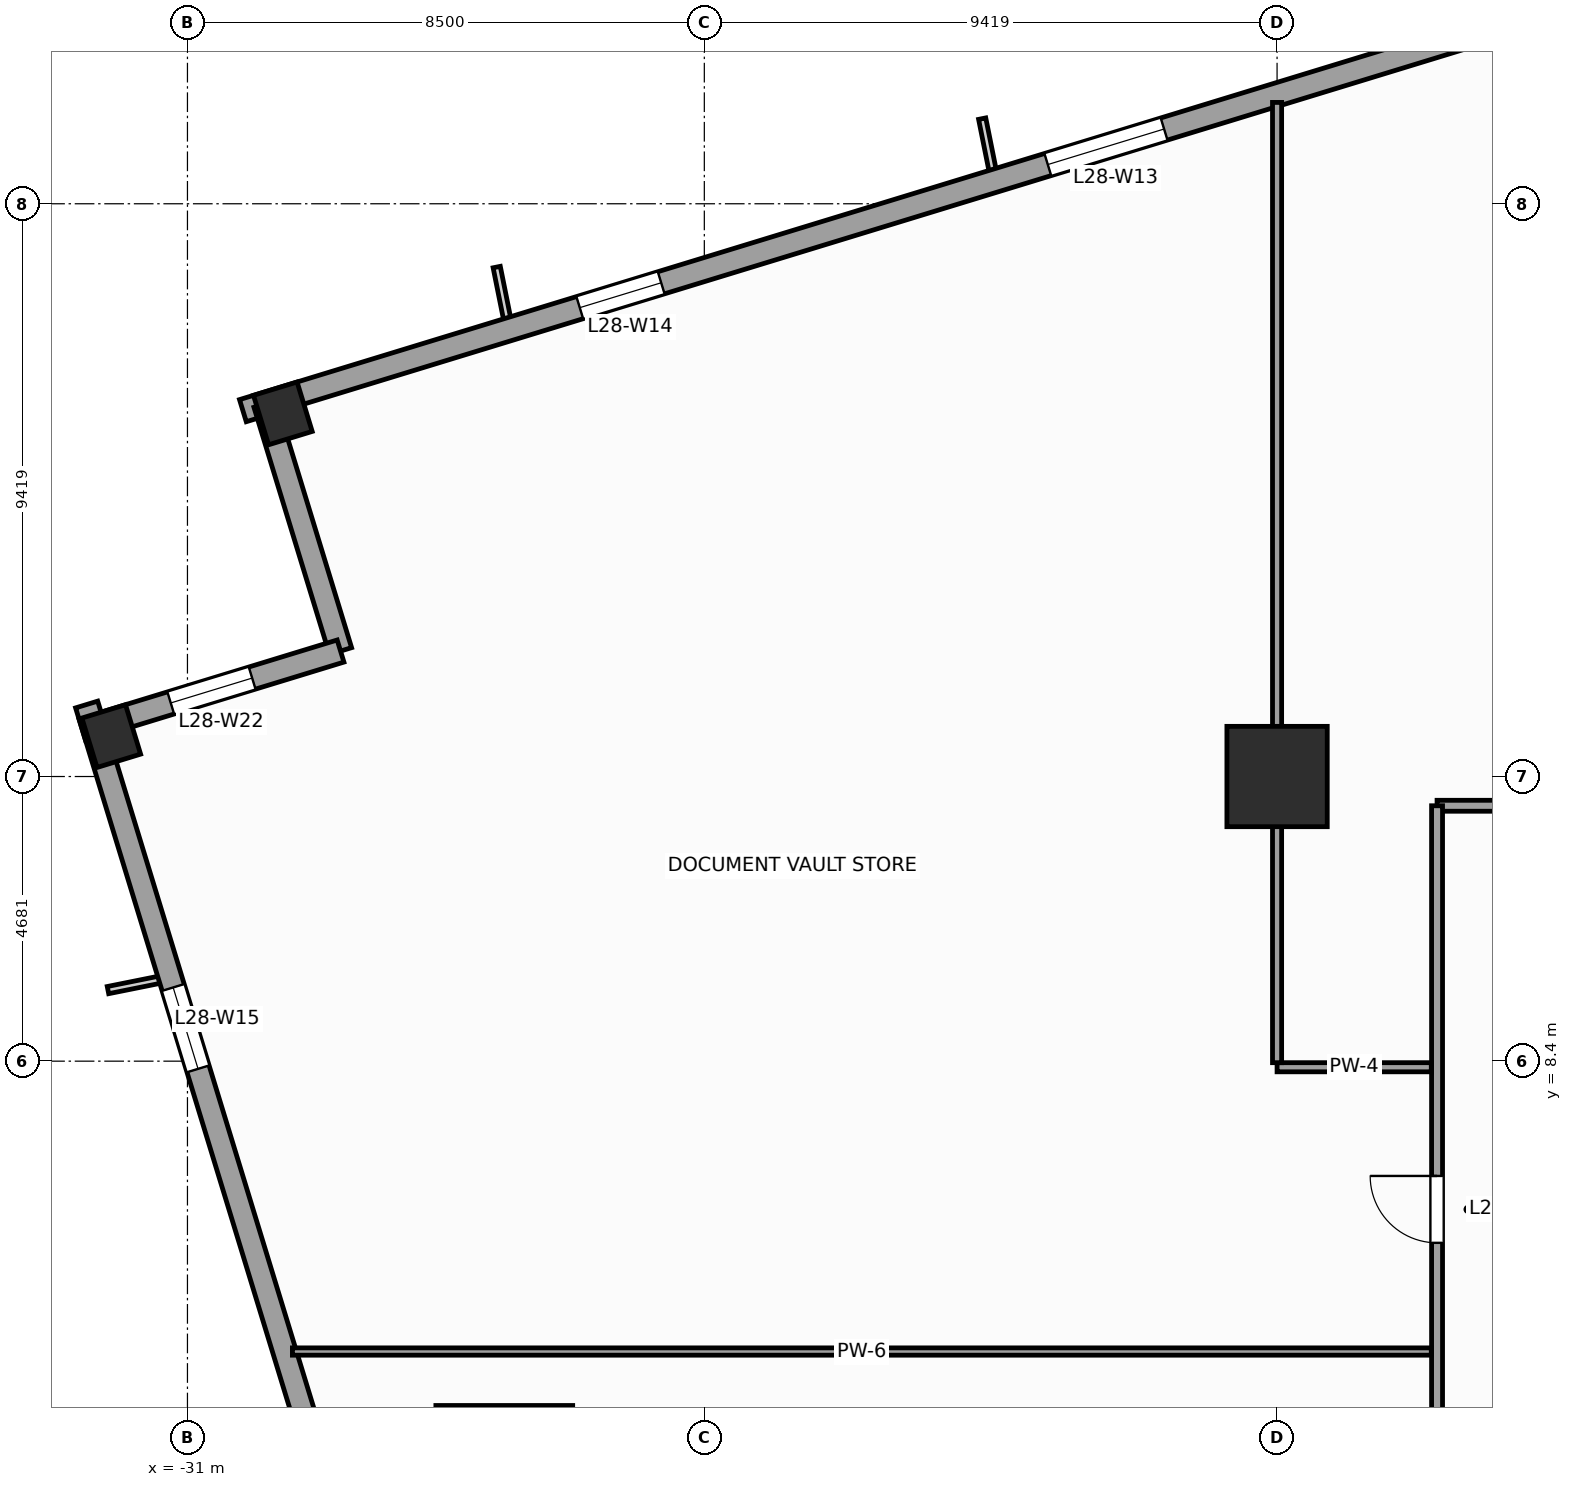
"""IFC4 building model, lengths in metres.
Left out: names, types, materials, properties, quantities, classifications, styles, units other than length and angle.
Written with IfcOpenShell. Run it as: python <this file> out.ifc"""

import sys

from ifc_helpers import new_model, si_unit, direction, frame, frame_2d, origin, origin_2d, place, context, subcontext, project, spatial, rectangle, extrude, source, transform, mapped, element, fill, save


model = new_model("IFC4")
c1 = context("Model", 3, precision=1e-05, world=origin(), true_north=direction((0.0, 1.0)))
c2 = subcontext(c1, "Body", "Model", "MODEL_VIEW")
j1 = project(units=[si_unit("LENGTHUNIT", "METRE"), si_unit("PLANEANGLEUNIT", "RADIAN")], contexts=[c1])
p1 = place(None, origin())
s1 = spatial("IfcSite", under=j1, at=p1, CompositionType="ELEMENT")
p2 = place(p1, origin())
s2 = spatial("IfcBuilding", under=s1, at=p2, CompositionType="ELEMENT")
p3 = place(p2, frame((0.0, 0.0, 119.2)))
s3 = spatial("IfcBuildingStorey", under=s2, at=p3, CompositionType="ELEMENT", Elevation=119.2)
m1 = source(origin(), c2, "Body", "SweptSolid", [
    extrude(rectangle(XDim=1.65, YDim=1.65, at=origin_2d()), origin(), (0.0, 0.0, 1.0), 4.0),
])
p4 = place(p3, frame((-13.081, 13.081, 0.0), z_axis=(0.0, 0.0, 1.0), x_axis=(1.0, 0.0, 0.0)))
e1 = element("IfcColumn", 1, at=p4, inside=s3, PredefinedType="COLUMN", context=c2, shape_type="MappedRepresentation", body=[
    mapped(m1, transform((0.0, 0.0, 0.0), scale=1.0)),
])
m2 = source(origin(), c2, "Body", "SweptSolid", [
    extrude(rectangle(XDim=0.75, YDim=0.85, at=origin_2d()), origin(), (0.0, 0.0, 1.0), 4.0),
])
for number, where, z_axis, x_axis in (
    (2, (-29.431, 19.052, 0.0), (0.0, 0.0, 1.0), (0.956, 0.292, 0.0)),
    (3, (-32.253, 13.746, 0.0), (0.0, 0.0, 1.0), (0.956, 0.292, 0.0)),
):
    element("IfcColumn", number, at=place(p3, frame(where, z_axis=z_axis, x_axis=x_axis)), inside=s3, PredefinedType="COLUMN", context=c2, shape_type="MappedRepresentation", body=[
        mapped(m2, transform((0.0, 0.0, 0.0), scale=1.0)),
    ])
p5 = place(p3, frame((14.265, 32.658, 0.0), z_axis=(0.0, 0.0, 1.0), x_axis=(-0.956304320851, -0.292373127906, 0.0)))
e4 = element("IfcWall", 4, at=p5, inside=s3, PredefinedType="STANDARD", context=c2, shape_type="SweptSolid", body=[
    extrude(rectangle(XDim=46.38, YDim=0.38, at=frame_2d((23.19, 0.0))), origin(), (0.0, 0.0, 1.0), 3.14),
])
p6 = place(p5, frame((4.865, 0.0, 0.51)))
e5 = element("IfcOpeningElement", 5, at=p6, cuts=e4, PredefinedType="OPENING", context=c2, shape_type="SweptSolid", body=[
    extrude(rectangle(XDim=1.4, YDim=2.4, at=frame_2d((0.7, 1.2))), frame((0.0, 0.2, 0.0), z_axis=(0.0, -1.0, 0.0), x_axis=(1.0, 0.0, 0.0)), (0.0, 0.0, 1.0), 0.4),
])
p7 = place(p5, frame((12.45, 0.0, 0.51)))
e6 = element("IfcOpeningElement", 6, at=p7, cuts=e4, PredefinedType="OPENING", context=c2, shape_type="SweptSolid", body=[
    extrude(rectangle(XDim=2.0, YDim=2.4, at=frame_2d((1.0, 1.2))), frame((0.0, 0.2, 0.0), z_axis=(0.0, -1.0, 0.0), x_axis=(1.0, 0.0, 0.0)), (0.0, 0.0, 1.0), 0.4),
])
p8 = place(p5, frame((20.512, 0.0, 0.51)))
e7 = element("IfcOpeningElement", 7, at=p8, cuts=e4, PredefinedType="OPENING", context=c2, shape_type="SweptSolid", body=[
    extrude(rectangle(XDim=2.0, YDim=2.4, at=frame_2d((1.0, 1.2))), frame((0.0, 0.2, 0.0), z_axis=(0.0, -1.0, 0.0), x_axis=(1.0, 0.0, 0.0)), (0.0, 0.0, 1.0), 0.4),
])
p9 = place(p5, frame((30.538, 0.0, 0.51)))
e8 = element("IfcOpeningElement", 8, at=p9, cuts=e4, PredefinedType="OPENING", context=c2, shape_type="SweptSolid", body=[
    extrude(rectangle(XDim=2.0, YDim=2.4, at=frame_2d((1.0, 1.2))), frame((0.0, 0.2, 0.0), z_axis=(0.0, -1.0, 0.0), x_axis=(1.0, 0.0, 0.0)), (0.0, 0.0, 1.0), 0.4),
])
p10 = place(p5, frame((39.187, 0.0, 0.51)))
e9 = element("IfcOpeningElement", 9, at=p10, cuts=e4, PredefinedType="OPENING", context=c2, shape_type="SweptSolid", body=[
    extrude(rectangle(XDim=1.4, YDim=2.4, at=frame_2d((0.7, 1.2))), frame((0.0, 0.2, 0.0), z_axis=(0.0, -1.0, 0.0), x_axis=(1.0, 0.0, 0.0)), (0.0, 0.0, 1.0), 0.4),
])
p11 = place(p3, frame((-29.725, 19.208, 0.0), z_axis=(0.0, 0.0, 1.0), x_axis=(0.292345507338, -0.956312764915, 0.0)))
e10 = element("IfcWall", 10, at=p11, inside=s3, PredefinedType="STANDARD", context=c2, shape_type="SweptSolid", body=[
    extrude(rectangle(XDim=4.25, YDim=0.38, at=frame_2d((2.125, 0.0))), origin(), (0.0, 0.0, 1.0), 3.74),
])
p12 = place(p3, frame((-28.482, 15.144, 0.0), z_axis=(0.0, 0.0, 1.0), x_axis=(-0.956304176051, -0.292373601522, 0.0)))
e11 = element("IfcWall", 11, at=p12, inside=s3, PredefinedType="STANDARD", context=c2, shape_type="SweptSolid", body=[
    extrude(rectangle(XDim=4.44, YDim=0.38, at=frame_2d((2.22, 0.0))), origin(), (0.0, 0.0, 1.0), 3.04),
])
p13 = place(p12, frame((1.52, 0.0, 0.51)))
e12 = element("IfcOpeningElement", 12, at=p13, cuts=e11, PredefinedType="OPENING", context=c2, shape_type="SweptSolid", body=[
    extrude(rectangle(XDim=1.4, YDim=2.4, at=frame_2d((0.7, 1.2))), frame((0.0, 0.2, 0.0), z_axis=(0.0, -1.0, 0.0), x_axis=(1.0, 0.0, 0.0)), (0.0, 0.0, 1.0), 0.4),
])
p14 = place(p3, frame((-32.658, 14.265, 0.0), z_axis=(0.0, 0.0, 1.0), x_axis=(0.292373127906, -0.956304320851, 0.0)))
e13 = element("IfcWall", 13, at=p14, inside=s3, PredefinedType="STANDARD", context=c2, shape_type="SweptSolid", body=[
    extrude(rectangle(XDim=46.38, YDim=0.38, at=frame_2d((23.19, 0.0))), origin(), (0.0, 0.0, 1.0), 3.14),
])
p15 = place(p14, frame((28.265, 0.0, 0.0)))
e14 = element("IfcOpeningElement", 14, at=p15, cuts=e13, PredefinedType="OPENING", context=c2, shape_type="SweptSolid", body=[
    extrude(rectangle(XDim=1.05, YDim=2.25, at=frame_2d((0.525, 1.125))), frame((0.0, 0.2, 0.0), z_axis=(0.0, -1.0, 0.0), x_axis=(1.0, 0.0, 0.0)), (0.0, 0.0, 1.0), 0.4),
])
p16 = place(p14, frame((4.865, 0.0, 0.51)))
e15 = element("IfcOpeningElement", 15, at=p16, cuts=e13, PredefinedType="OPENING", context=c2, shape_type="SweptSolid", body=[
    extrude(rectangle(XDim=1.4, YDim=2.4, at=frame_2d((0.7, 1.2))), frame((0.0, 0.2, 0.0), z_axis=(0.0, -1.0, 0.0), x_axis=(1.0, 0.0, 0.0)), (0.0, 0.0, 1.0), 0.4),
])
p17 = place(p14, frame((12.45, 0.0, 0.51)))
e16 = element("IfcOpeningElement", 16, at=p17, cuts=e13, PredefinedType="OPENING", context=c2, shape_type="SweptSolid", body=[
    extrude(rectangle(XDim=2.0, YDim=2.4, at=frame_2d((1.0, 1.2))), frame((0.0, 0.2, 0.0), z_axis=(0.0, -1.0, 0.0), x_axis=(1.0, 0.0, 0.0)), (0.0, 0.0, 1.0), 0.4),
])
p18 = place(p14, frame((20.512, 0.0, 0.51)))
e17 = element("IfcOpeningElement", 17, at=p18, cuts=e13, PredefinedType="OPENING", context=c2, shape_type="SweptSolid", body=[
    extrude(rectangle(XDim=2.0, YDim=2.4, at=frame_2d((1.0, 1.2))), frame((0.0, 0.2, 0.0), z_axis=(0.0, -1.0, 0.0), x_axis=(1.0, 0.0, 0.0)), (0.0, 0.0, 1.0), 0.4),
])
p19 = place(p14, frame((30.538, 0.0, 0.51)))
e18 = element("IfcOpeningElement", 18, at=p19, cuts=e13, PredefinedType="OPENING", context=c2, shape_type="SweptSolid", body=[
    extrude(rectangle(XDim=2.0, YDim=2.4, at=frame_2d((1.0, 1.2))), frame((0.0, 0.2, 0.0), z_axis=(0.0, -1.0, 0.0), x_axis=(1.0, 0.0, 0.0)), (0.0, 0.0, 1.0), 0.4),
])
p20 = place(p14, frame((39.187, 0.0, 0.51)))
e19 = element("IfcOpeningElement", 19, at=p20, cuts=e13, PredefinedType="OPENING", context=c2, shape_type="SweptSolid", body=[
    extrude(rectangle(XDim=1.4, YDim=2.4, at=frame_2d((0.7, 1.2))), frame((0.0, 0.2, 0.0), z_axis=(0.0, -1.0, 0.0), x_axis=(1.0, 0.0, 0.0)), (0.0, 0.0, 1.0), 0.4),
])
p21 = place(p3, frame((-10.45, 12.6, 0.0), z_axis=(0.0, 0.0, 1.0), x_axis=(1.0, 0.0, 0.0)))
e20 = element("IfcWall", 20, at=p21, inside=s3, PredefinedType="PARTITIONING", context=c2, shape_type="SweptSolid", body=[
    extrude(rectangle(XDim=22.0, YDim=0.18, at=frame_2d((11.0, 0.0))), origin(), (0.0, 0.0, 1.0), 3.74),
])
p22 = place(p21, frame((4.839, 0.0, 0.0)))
e21 = element("IfcOpeningElement", 21, at=p22, cuts=e20, PredefinedType="OPENING", context=c2, shape_type="SweptSolid", body=[
    extrude(rectangle(XDim=1.1, YDim=2.2, at=frame_2d((0.55, 1.1))), frame((0.0, 0.1, 0.0), z_axis=(0.0, -1.0, 0.0), x_axis=(1.0, 0.0, 0.0)), (0.0, 0.0, 1.0), 0.2),
])
p23 = place(p21, frame((13.1, 0.0, 0.0)))
e22 = element("IfcOpeningElement", 22, at=p23, cuts=e20, PredefinedType="OPENING", context=c2, shape_type="SweptSolid", body=[
    extrude(rectangle(XDim=1.1, YDim=2.2, at=frame_2d((0.55, 1.1))), frame((0.0, 0.1, 0.0), z_axis=(0.0, -1.0, 0.0), x_axis=(1.0, 0.0, 0.0)), (0.0, 0.0, 1.0), 0.2),
])
p24 = place(p21, frame((18.71, 0.0, 0.0)))
e23 = element("IfcOpeningElement", 23, at=p24, cuts=e20, PredefinedType="OPENING", context=c2, shape_type="SweptSolid", body=[
    extrude(rectangle(XDim=1.1, YDim=2.2, at=frame_2d((0.55, 1.1))), frame((0.0, 0.1, 0.0), z_axis=(0.0, -1.0, 0.0), x_axis=(1.0, 0.0, 0.0)), (0.0, 0.0, 1.0), 0.2),
])
p25 = place(p3, frame((-10.45, -1.05, 0.0), z_axis=(0.0, 0.0, 1.0), x_axis=(0.0, 1.0, 0.0)))
e24 = element("IfcWall", 24, at=p25, inside=s3, PredefinedType="PARTITIONING", context=c2, shape_type="SweptSolid", body=[
    extrude(rectangle(XDim=13.65, YDim=0.18, at=frame_2d((6.825, 0.0))), origin(), (0.0, 0.0, 1.0), 3.74),
])
p26 = place(p25, frame((1.455, 0.0, 0.0)))
e25 = element("IfcOpeningElement", 25, at=p26, cuts=e24, PredefinedType="OPENING", context=c2, shape_type="SweptSolid", body=[
    extrude(rectangle(XDim=0.95, YDim=2.1, at=frame_2d((0.475, 1.05))), frame((0.0, 0.1, 0.0), z_axis=(0.0, -1.0, 0.0), x_axis=(1.0, 0.0, 0.0)), (0.0, 0.0, 1.0), 0.2),
])
p27 = place(p25, frame((6.462, 0.0, 0.0)))
e26 = element("IfcOpeningElement", 26, at=p27, cuts=e24, PredefinedType="OPENING", context=c2, shape_type="SweptSolid", body=[
    extrude(rectangle(XDim=1.1, YDim=2.2, at=frame_2d((0.55, 1.1))), frame((0.0, 0.1, 0.0), z_axis=(0.0, -1.0, 0.0), x_axis=(1.0, 0.0, 0.0)), (0.0, 0.0, 1.0), 0.2),
])
p28 = place(p3, frame((-10.545, 8.3, 0.0), z_axis=(0.0, 0.0, 1.0), x_axis=(-1.0, 0.0, 0.0)))
e27 = element("IfcWall", 27, at=p28, inside=s3, PredefinedType="PARTITIONING", context=c2, shape_type="SweptSolid", body=[
    extrude(rectangle(XDim=2.536, YDim=0.15, at=frame_2d((1.268, 0.0))), origin(), (0.0, 0.0, 1.0), 3.74),
])
p29 = place(p3, frame((-13.081, 8.375, 0.0), z_axis=(0.0, 0.0, 1.0), x_axis=(0.0, 1.0, 0.0)))
e28 = element("IfcWall", 28, at=p29, inside=s3, PredefinedType="PARTITIONING", context=c2, shape_type="SweptSolid", body=[
    extrude(rectangle(XDim=15.792, YDim=0.15, at=frame_2d((7.896, 0.0))), origin(), (0.0, 0.0, 1.0), 2.732),
])
p30 = place(p3, frame((-29.274, 3.625, 0.0), z_axis=(0.0, 0.0, 1.0), x_axis=(1.0, 0.0, 0.0)))
e29 = element("IfcWall", 29, at=p30, inside=s3, PredefinedType="PARTITIONING", context=c2, shape_type="SweptSolid", body=[
    extrude(rectangle(XDim=18.729, YDim=0.12, at=frame_2d((9.365, 0.0))), origin(), (0.0, 0.0, 1.0), 3.74),
])
p31 = place(p3, frame((-26.915, 2.67, 0.0), z_axis=(0.0, 0.0, 1.0), x_axis=(1.0, 0.0, 0.0)))
e30 = element("IfcWall", 30, at=p31, inside=s3, PredefinedType="PARTITIONING", context=c2, shape_type="SweptSolid", body=[
    extrude(rectangle(XDim=2.25, YDim=0.135, at=frame_2d((1.125, 0.0))), origin(), (0.0, 0.0, 1.0), 3.74),
])
m3 = source(origin(), c2, "Body", "SweptSolid", [
    extrude(rectangle(XDim=2.0, YDim=2.4, at=frame_2d((1.0, 1.2))), frame((0.0, 0.03, 0.0), z_axis=(0.0, -1.0, 0.0), x_axis=(1.0, 0.0, 0.0)), (0.0, 0.0, 1.0), 0.06),
])
p32 = place(p9, origin())
e31 = element("IfcWindow", 31, at=p32, inside=s3, PartitioningType="SINGLE_PANEL", PredefinedType="WINDOW", context=c2, shape_type="MappedRepresentation", body=[
    mapped(m3, transform((0.0, 0.0, 0.0), scale=1.0)),
])
fill(e8, e31)
m4 = source(origin(), c2, "Body", "SweptSolid", [
    extrude(rectangle(XDim=1.4, YDim=2.4, at=frame_2d((0.7, 1.2))), frame((0.0, 0.03, 0.0), z_axis=(0.0, -1.0, 0.0), x_axis=(1.0, 0.0, 0.0)), (0.0, 0.0, 1.0), 0.06),
])
p33 = place(p10, origin())
e32 = element("IfcWindow", 32, at=p33, inside=s3, PartitioningType="SINGLE_PANEL", PredefinedType="WINDOW", context=c2, shape_type="MappedRepresentation", body=[
    mapped(m4, transform((0.0, 0.0, 0.0), scale=1.0)),
])
fill(e9, e32)
p34 = place(p16, origin())
e33 = element("IfcWindow", 33, at=p34, inside=s3, PartitioningType="SINGLE_PANEL", PredefinedType="WINDOW", context=c2, shape_type="MappedRepresentation", body=[
    mapped(m4, transform((0.0, 0.0, 0.0), scale=1.0)),
])
fill(e15, e33)
p35 = place(p13, origin())
e34 = element("IfcWindow", 34, at=p35, inside=s3, PartitioningType="SINGLE_PANEL", PredefinedType="WINDOW", context=c2, shape_type="MappedRepresentation", body=[
    mapped(m4, transform((0.0, 0.0, 0.0), scale=1.0)),
])
fill(e12, e34)
m5 = source(origin(), c2, "Body", "SweptSolid", [
    extrude(rectangle(XDim=1.1, YDim=2.2, at=frame_2d((0.55, 1.1))), frame((0.0, 0.025, 0.0), z_axis=(0.0, -1.0, 0.0), x_axis=(1.0, 0.0, 0.0)), (0.0, 0.0, 1.0), 0.05),
])
p36 = place(p27, origin())
e35 = element("IfcDoor", 35, at=p36, inside=s3, OperationType="SINGLE_SWING_RIGHT", PredefinedType="DOOR", context=c2, shape_type="MappedRepresentation", body=[
    mapped(m5, transform((0.0, 0.0, 0.0), scale=1.0)),
])
fill(e26, e35)
save(model, sys.argv[1])
